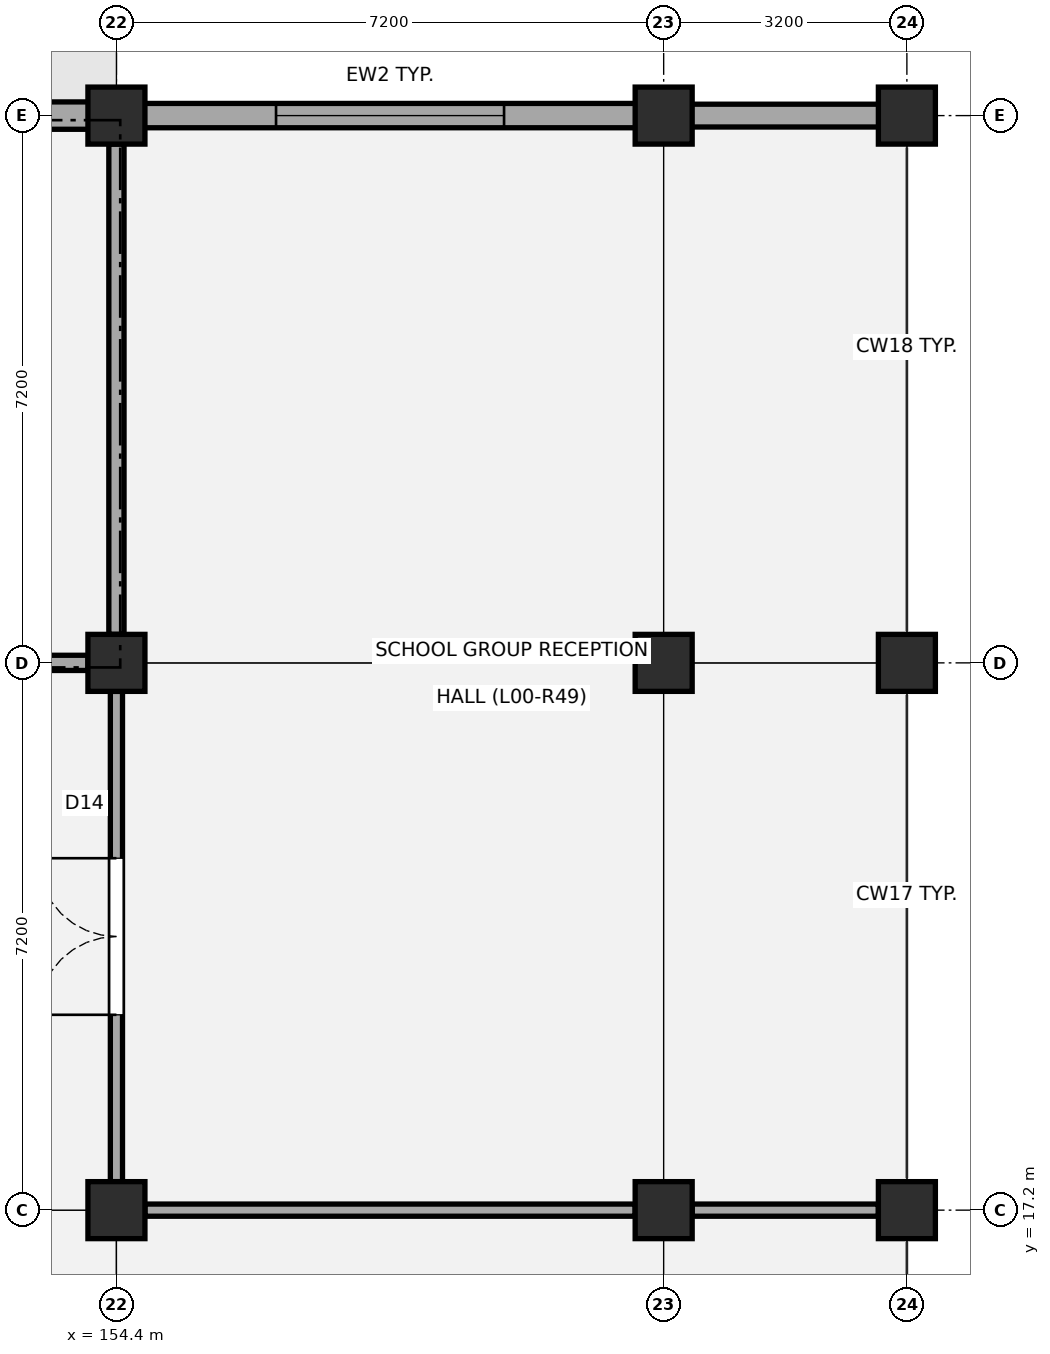
"""IFC4 building model, lengths in metres.
Left out: names, types, materials, properties, quantities, classifications, styles, units other than length and angle.
Written with IfcOpenShell. Run it as: python <this file> out.ifc"""

import sys

from ifc_helpers import new_model, si_unit, direction, frame, frame_2d, origin, origin_2d, place, context, subcontext, project, spatial, rectangle, circle, extrude, element, fill, save


model = new_model("IFC4")
c1 = context("Model", 3, precision=1e-05, world=origin(), true_north=direction((0.0, 1.0)))
c2 = subcontext(c1, "Body", "Model", "MODEL_VIEW")
j1 = project(units=[si_unit("LENGTHUNIT", "METRE"), si_unit("PLANEANGLEUNIT", "RADIAN")], contexts=[c1])
p1 = place(None, origin())
s1 = spatial("IfcSite", under=j1, at=p1, CompositionType="ELEMENT")
p2 = place(p1, origin())
s2 = spatial("IfcBuilding", under=s1, at=p2, CompositionType="ELEMENT")
p3 = place(p2, origin())
s3 = spatial("IfcBuildingStorey", under=s2, at=p3, CompositionType="ELEMENT", Elevation=0.0)
for number, where, z_axis, x_axis in (
    (1, (154.4, 17.2, -0.35), (0.0, 0.0, 1.0), (1.0, 0.0, 0.0)),
    (2, (154.4, 24.4, -0.35), (0.0, 0.0, 1.0), (1.0, 0.0, 0.0)),
    (3, (154.4, 31.6, -0.35), (0.0, 0.0, 1.0), (1.0, 0.0, 0.0)),
    (4, (161.6, 17.2, -0.35), (0.0, 0.0, 1.0), (1.0, 0.0, 0.0)),
    (5, (161.6, 24.4, -0.35), (0.0, 0.0, 1.0), (1.0, 0.0, 0.0)),
    (6, (161.6, 31.6, -0.35), (0.0, 0.0, 1.0), (1.0, 0.0, 0.0)),
    (7, (164.8, 17.2, -0.35), (0.0, 0.0, 1.0), (1.0, 0.0, 0.0)),
    (8, (164.8, 24.4, -0.35), (0.0, 0.0, 1.0), (1.0, 0.0, 0.0)),
    (9, (164.8, 31.6, -0.35), (0.0, 0.0, 1.0), (1.0, 0.0, 0.0)),
):
    element("IfcColumn", number, at=place(p3, frame(where, z_axis=z_axis, x_axis=x_axis)), inside=s3, PredefinedType="COLUMN", context=c2, shape_type="SweptSolid", body=[
        extrude(circle(Radius=0.375, at=origin_2d()), origin(), (0.0, 0.0, 1.0), 5.03),
    ])
p4 = place(p3, frame((147.545, 31.6, 0.0), z_axis=(0.0, 0.0, 1.0), x_axis=(1.0, 0.0, 0.0)))
e10 = element("IfcWall", 10, at=p4, inside=s3, PredefinedType="STANDARD", context=c2, shape_type="SweptSolid", body=[
    extrude(rectangle(XDim=6.545, YDim=0.36, at=frame_2d((3.272, 0.0))), origin(), (0.0, 0.0, 1.0), 3.67),
])
p5 = place(p4, frame((4.82, 0.0, 0.0)))
e11 = element("IfcOpeningElement", 11, at=p5, cuts=e10, PredefinedType="OPENING", context=c2, shape_type="SweptSolid", body=[
    extrude(rectangle(XDim=1.1, YDim=2.15, at=frame_2d((0.55, 1.075))), frame((0.0, 0.19, 0.0), z_axis=(0.0, -1.0, 0.0), x_axis=(1.0, 0.0, 0.0)), (0.0, 0.0, 1.0), 0.38),
])
p6 = place(p3, frame((154.71, 31.6, 0.0), z_axis=(0.0, 0.0, 1.0), x_axis=(1.0, 0.0, 0.0)))
e12 = element("IfcWall", 12, at=p6, inside=s3, PredefinedType="STANDARD", context=c2, shape_type="SweptSolid", body=[
    extrude(rectangle(XDim=6.58, YDim=0.32, at=frame_2d((3.29, 0.0))), origin(), (0.0, 0.0, 1.0), 3.75),
])
p7 = place(p6, frame((1.79, 0.0, 0.95)))
e13 = element("IfcOpeningElement", 13, at=p7, cuts=e12, PredefinedType="OPENING", context=c2, shape_type="SweptSolid", body=[
    extrude(rectangle(XDim=3.0, YDim=1.85, at=frame_2d((1.5, 0.925))), frame((0.0, 0.17, 0.0), z_axis=(0.0, -1.0, 0.0), x_axis=(1.0, 0.0, 0.0)), (0.0, 0.0, 1.0), 0.34),
])
p8 = place(p3, frame((161.91, 31.6, 0.0), z_axis=(0.0, 0.0, 1.0), x_axis=(1.0, 0.0, 0.0)))
e14 = element("IfcWall", 14, at=p8, inside=s3, PredefinedType="STANDARD", context=c2, shape_type="SweptSolid", body=[
    extrude(rectangle(XDim=2.58, YDim=0.3, at=frame_2d((1.29, 0.0))), origin(), (0.0, 0.0, 1.0), 3.75),
])
p9 = place(p3, frame((154.4, 24.775, 0.0), z_axis=(0.0, 0.0, 1.0), x_axis=(0.0, 1.0, 0.0)))
e15 = element("IfcWall", 15, at=p9, inside=s3, PredefinedType="PARTITIONING", context=c2, shape_type="SweptSolid", body=[
    extrude(rectangle(XDim=6.45, YDim=0.2, at=frame_2d((3.225, 0.0))), origin(), (0.0, 0.0, 1.0), 3.62),
])
p10 = place(p3, frame((151.74, 24.4, 0.0), z_axis=(0.0, 0.0, 1.0), x_axis=(1.0, 0.0, 0.0)))
e16 = element("IfcWall", 16, at=p10, inside=s3, PredefinedType="PARTITIONING", context=c2, shape_type="SweptSolid", body=[
    extrude(rectangle(XDim=2.285, YDim=0.2, at=frame_2d((1.143, 0.0))), origin(), (0.0, 0.0, 1.0), 3.62),
])
p11 = place(p10, frame((0.633, 0.0, 0.0)))
e17 = element("IfcOpeningElement", 17, at=p11, cuts=e16, PredefinedType="OPENING", context=c2, shape_type="SweptSolid", body=[
    extrude(rectangle(XDim=1.02, YDim=2.15, at=frame_2d((0.51, 1.075))), frame((0.0, 0.11, 0.0), z_axis=(0.0, -1.0, 0.0), x_axis=(1.0, 0.0, 0.0)), (0.0, 0.0, 1.0), 0.22),
])
p12 = place(p3, frame((154.4, 17.575, 0.0), z_axis=(0.0, 0.0, 1.0), x_axis=(0.0, 1.0, 0.0)))
e18 = element("IfcWall", 18, at=p12, inside=s3, PredefinedType="PARTITIONING", context=c2, shape_type="SweptSolid", body=[
    extrude(rectangle(XDim=6.45, YDim=0.16, at=frame_2d((3.225, 0.0))), origin(), (0.0, 0.0, 1.0), 3.62),
])
p13 = place(p12, frame((2.195, 0.0, 0.0)))
e19 = element("IfcOpeningElement", 19, at=p13, cuts=e18, PredefinedType="OPENING", context=c2, shape_type="SweptSolid", body=[
    extrude(rectangle(XDim=2.06, YDim=2.28, at=frame_2d((1.03, 1.14))), frame((0.0, 0.09, 0.0), z_axis=(0.0, -1.0, 0.0), x_axis=(1.0, 0.0, 0.0)), (0.0, 0.0, 1.0), 0.18),
])
p14 = place(p3, frame((154.775, 17.2, 0.0), z_axis=(0.0, 0.0, 1.0), x_axis=(1.0, 0.0, 0.0)))
e20 = element("IfcWall", 20, at=p14, inside=s3, PredefinedType="PARTITIONING", context=c2, shape_type="SweptSolid", body=[
    extrude(rectangle(XDim=6.45, YDim=0.16, at=frame_2d((3.225, 0.0))), origin(), (0.0, 0.0, 1.0), 3.7),
])
p15 = place(p3, frame((161.975, 17.2, 0.0), z_axis=(0.0, 0.0, 1.0), x_axis=(1.0, 0.0, 0.0)))
e21 = element("IfcWall", 21, at=p15, inside=s3, PredefinedType="PARTITIONING", context=c2, shape_type="SweptSolid", body=[
    extrude(rectangle(XDim=2.45, YDim=0.16, at=frame_2d((1.225, 0.0))), origin(), (0.0, 0.0, 1.0), 3.6),
])
p16 = place(p7, origin())
e22 = element("IfcWindow", 22, at=p16, inside=s3, PartitioningType="SINGLE_PANEL", PredefinedType="WINDOW", context=c2, shape_type="SweptSolid", body=[
    extrude(rectangle(XDim=3.0, YDim=1.85, at=frame_2d((1.5, 0.925))), frame((0.0, 0.03, 0.0), z_axis=(0.0, -1.0, 0.0), x_axis=(1.0, 0.0, 0.0)), (0.0, 0.0, 1.0), 0.06),
])
fill(e13, e22)
p17 = place(p13, origin())
e23 = element("IfcDoor", 23, at=p17, inside=s3, OperationType="DOUBLE_DOOR_SINGLE_SWING", PredefinedType="DOOR", context=c2, shape_type="SweptSolid", body=[
    extrude(rectangle(XDim=2.06, YDim=2.28, at=frame_2d((1.03, 1.14))), frame((0.0, 0.025, 0.0), z_axis=(0.0, -1.0, 0.0), x_axis=(1.0, 0.0, 0.0)), (0.0, 0.0, 1.0), 0.05),
])
fill(e19, e23)
save(model, sys.argv[1])
